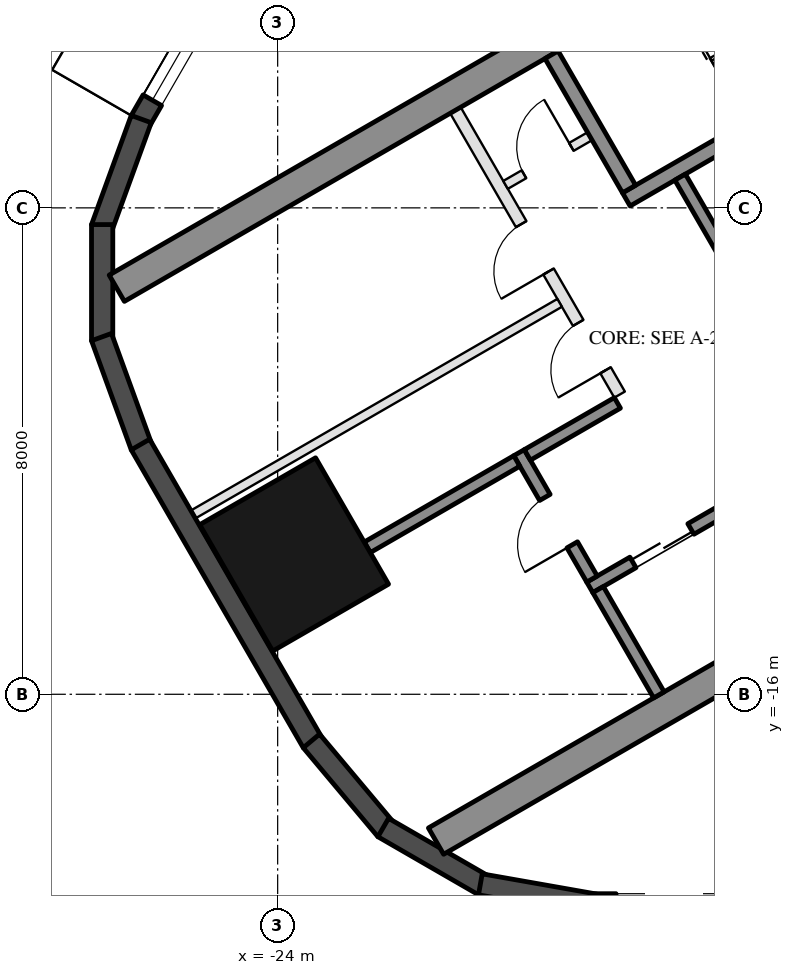
"""IFC4 building model, lengths in metres.
Left out: names, types, materials, properties, quantities, classifications, styles, units other than length and angle.
Written with IfcOpenShell. Run it as: python <this file> out.ifc"""

import sys

from ifc_helpers import new_model, si_unit, direction, frame, frame_2d, origin, origin_2d, place, context, subcontext, project, spatial, rectangle, hollow_rectangle, extrude, element, fill, save


model = new_model("IFC4")
c1 = context("Model", 3, precision=1e-05, world=origin(), true_north=direction((0.0, 1.0)))
c2 = subcontext(c1, "Body", "Model", "MODEL_VIEW")
j1 = project(units=[si_unit("LENGTHUNIT", "METRE"), si_unit("PLANEANGLEUNIT", "RADIAN")], contexts=[c1])
p1 = place(None, origin())
s1 = spatial("IfcSite", under=j1, at=p1, CompositionType="ELEMENT")
p2 = place(p1, origin())
s2 = spatial("IfcBuilding", under=s1, at=p2, CompositionType="ELEMENT")
p3 = place(p2, frame((0.0, 0.0, 209.5)))
s3 = spatial("IfcBuildingStorey", under=s2, at=p3, CompositionType="ELEMENT", Elevation=209.5)
p4 = place(p3, frame((-23.729, -13.7, 0.0), z_axis=(0.0, 0.0, 1.0), x_axis=(-0.5, 0.866025403784, 0.0)))
e1 = element("IfcColumn", 1, at=p4, inside=s3, PredefinedType="COLUMN", context=c2, shape_type="SweptSolid", body=[
    extrude(hollow_rectangle(XDim=2.4, YDim=2.2, WallThickness=0.06, at=origin_2d()), origin(), (0.0, 0.0, 1.0), 3.7),
])
p5 = place(p3, frame((-24.299, -3.176, 0.0), z_axis=(0.0, 0.0, 1.0), x_axis=(-0.500028278809, -0.866009076391, 0.0)))
e2 = element("IfcWall", 2, at=p5, inside=s3, PredefinedType="SOLIDWALL", context=c2, shape_type="SweptSolid", body=[
    extrude(rectangle(XDim=3.916, YDim=0.35, at=frame_2d((1.958, 0.0))), origin(), (0.0, 0.0, 1.0), 3.55),
])
p6 = place(p5, frame((1.625, 0.0, 0.3)))
e3 = element("IfcOpeningElement", 3, at=p6, cuts=e2, PredefinedType="OPENING", context=c2, shape_type="SweptSolid", body=[
    extrude(rectangle(XDim=1.9, YDim=2.65, at=frame_2d((0.95, 1.325))), frame((0.0, 0.185, 0.0), z_axis=(0.0, -1.0, 0.0), x_axis=(1.0, 0.0, 0.0)), (0.0, 0.0, 1.0), 0.37),
])
for number, where, z_axis, x_axis in (
    (4, (-26.244, -6.54, 0.0), (0.0, 0.0, 1.0), (-0.342, -0.94, 0.0)),
    (5, (-26.886, -8.275, 0.0), (0.0, 0.0, 1.0), (0.0, -1.0, 0.0)),
    (6, (-26.897, -10.125, 0.0), (0.0, 0.0, 1.0), (0.342, -0.94, 0.0)),
):
    element("IfcWall", number, at=place(p3, frame(where, z_axis=z_axis, x_axis=x_axis)), inside=s3, PredefinedType="SOLIDWALL", context=c2, shape_type="SweptSolid", body=[
        extrude(rectangle(XDim=1.91, YDim=0.35, at=frame_2d((0.955, 0.0))), origin(), (0.0, 0.0, 1.0), 3.55),
    ])
p7 = place(p3, frame((-26.257, -11.893, 0.0), z_axis=(0.0, 0.0, 1.0), x_axis=(0.500018773155, -0.866014564827, 0.0)))
e7 = element("IfcWall", 7, at=p7, inside=s3, PredefinedType="SOLIDWALL", context=c2, shape_type="SweptSolid", body=[
    extrude(rectangle(XDim=5.658, YDim=0.35, at=frame_2d((2.829, 0.0))), origin(), (0.0, 0.0, 1.0), 3.55),
])
for number, where, z_axis, x_axis in (
    (8, (-23.445, -16.768, 0.0), (0.0, 0.0, 1.0), (0.643, -0.766, 0.0)),
    (9, (-22.264, -18.192, 0.0), (0.0, 0.0, 1.0), (0.866, -0.5, 0.0)),
):
    element("IfcWall", number, at=place(p3, frame(where, z_axis=z_axis, x_axis=x_axis)), inside=s3, PredefinedType="SOLIDWALL", context=c2, shape_type="SweptSolid", body=[
        extrude(rectangle(XDim=1.91, YDim=0.35, at=frame_2d((0.955, 0.0))), origin(), (0.0, 0.0, 1.0), 3.55),
    ])
p8 = place(p3, frame((-20.667, -19.126, 0.0), z_axis=(0.0, 0.0, 1.0), x_axis=(0.984798995425, -0.173697837091, 0.0)))
e10 = element("IfcWall", 10, at=p8, inside=s3, PredefinedType="SOLIDWALL", context=c2, shape_type="SweptSolid", body=[
    extrude(rectangle(XDim=1.91, YDim=0.35, at=frame_2d((0.955, 0.0))), origin(), (0.0, 0.0, 1.0), 3.55),
])
p9 = place(p3, frame((-18.816, -19.455, 0.0), z_axis=(0.0, 0.0, 1.0), x_axis=(1.0, 0.0, 0.0)))
e11 = element("IfcWall", 11, at=p9, inside=s3, PredefinedType="SOLIDWALL", context=c2, shape_type="SweptSolid", body=[
    extrude(rectangle(XDim=11.816, YDim=0.35, at=frame_2d((5.908, 0.0))), origin(), (0.0, 0.0, 1.0), 3.55),
])
p10 = place(p9, frame((0.381, 0.0, 0.3)))
e12 = element("IfcOpeningElement", 12, at=p10, cuts=e11, PredefinedType="OPENING", context=c2, shape_type="SweptSolid", body=[
    extrude(rectangle(XDim=1.9, YDim=2.65, at=frame_2d((0.95, 1.325))), frame((0.0, 0.185, 0.0), z_axis=(0.0, -1.0, 0.0), x_axis=(1.0, 0.0, 0.0)), (0.0, 0.0, 1.0), 0.37),
])
p11 = place(p9, frame((7.79, 0.0, 0.0)))
e13 = element("IfcOpeningElement", 13, at=p11, cuts=e11, PredefinedType="OPENING", context=c2, shape_type="SweptSolid", body=[
    extrude(rectangle(XDim=2.4, YDim=2.4, at=frame_2d((1.2, 1.2))), frame((0.0, 0.185, 0.0), z_axis=(0.0, -1.0, 0.0), x_axis=(1.0, 0.0, 0.0)), (0.0, 0.0, 1.0), 0.37),
])
p12 = place(p9, frame((3.741, 0.0, 0.3)))
e14 = element("IfcOpeningElement", 14, at=p12, cuts=e11, PredefinedType="OPENING", context=c2, shape_type="SweptSolid", body=[
    extrude(rectangle(XDim=1.7, YDim=2.65, at=frame_2d((0.85, 1.325))), frame((0.0, 0.185, 0.0), z_axis=(0.0, -1.0, 0.0), x_axis=(1.0, 0.0, 0.0)), (0.0, 0.0, 1.0), 0.37),
])
p13 = place(p9, frame((5.741, 0.0, 0.3)))
e15 = element("IfcOpeningElement", 15, at=p13, cuts=e11, PredefinedType="OPENING", context=c2, shape_type="SweptSolid", body=[
    extrude(rectangle(XDim=1.7, YDim=2.65, at=frame_2d((0.85, 1.325))), frame((0.0, 0.185, 0.0), z_axis=(0.0, -1.0, 0.0), x_axis=(1.0, 0.0, 0.0)), (0.0, 0.0, 1.0), 0.37),
])
for number, where, z_axis, x_axis in (
    (16, (-13.797, -1.903, 0.0), (0.0, 0.0, 1.0), (-0.866, -0.5, 0.0)),
    (17, (-8.547, -10.997, 0.0), (0.0, 0.0, 1.0), (-0.866, -0.5, 0.0)),
):
    element("IfcWall", number, at=place(p3, frame(where, z_axis=z_axis, x_axis=x_axis)), inside=s3, PredefinedType="SHEAR", context=c2, shape_type="SweptSolid", body=[
        extrude(rectangle(XDim=14.837, YDim=0.5, at=frame_2d((7.418, 0.0))), origin(), (0.0, 0.0, 1.0), 3.5),
    ])
p14 = place(p3, frame((-12.681, -4.636, 0.0), z_axis=(0.0, 0.0, 1.0), x_axis=(-0.866021702275, -0.500006411147, 0.0)))
e18 = element("IfcWall", 18, at=p14, inside=s3, PredefinedType="SHEAR", context=c2, shape_type="SweptSolid", body=[
    extrude(rectangle(XDim=6.45, YDim=0.25, at=frame_2d((3.225, 0.0))), origin(), (0.0, 0.0, 1.0), 3.5),
])
p15 = place(p14, frame((0.3, 0.0, 0.0)))
e19 = element("IfcOpeningElement", 19, at=p15, cuts=e18, PredefinedType="OPENING", context=c2, shape_type="SweptSolid", body=[
    extrude(rectangle(XDim=1.0, YDim=2.1, at=frame_2d((0.5, 1.05))), frame((0.0, 0.135, 0.0), z_axis=(0.0, -1.0, 0.0), x_axis=(1.0, 0.0, 0.0)), (0.0, 0.0, 1.0), 0.27),
])
p16 = place(p3, frame((-19.496, -5.482, 0.0), z_axis=(0.0, 0.0, 1.0), x_axis=(0.499990435942, -0.866030925526, 0.0)))
e20 = element("IfcWall", 20, at=p16, inside=s3, PredefinedType="SHEAR", context=c2, shape_type="SweptSolid", body=[
    extrude(rectangle(XDim=2.55, YDim=0.25, at=frame_2d((1.275, 0.0))), origin(), (0.0, 0.0, 1.0), 3.5),
])
p17 = place(p3, frame((-17.381, -7.495, 0.0), z_axis=(0.0, 0.0, 1.0), x_axis=(0.500011755427, -0.866018616679, 0.0)))
e21 = element("IfcWall", 21, at=p17, inside=s3, PredefinedType="SHEAR", context=c2, shape_type="SweptSolid", body=[
    extrude(rectangle(XDim=2.8, YDim=0.2, at=frame_2d((1.4, 0.0))), origin(), (0.0, 0.0, 1.0), 3.5),
])
p18 = place(p3, frame((-10.068, -9.162, 0.0), z_axis=(0.0, 0.0, 1.0), x_axis=(-0.866032725843, -0.499987317609, 0.0)))
e22 = element("IfcWall", 22, at=p18, inside=s3, PredefinedType="SHEAR", context=c2, shape_type="SweptSolid", body=[
    extrude(rectangle(XDim=10.16, YDim=0.2, at=frame_2d((5.08, 0.0))), origin(), (0.0, 0.0, 1.0), 3.5),
])
p19 = place(p18, frame((0.62, 0.0, 0.0)))
e23 = element("IfcOpeningElement", 23, at=p19, cuts=e22, PredefinedType="OPENING", context=c2, shape_type="SweptSolid", body=[
    extrude(rectangle(XDim=1.1, YDim=2.1, at=frame_2d((0.55, 1.05))), frame((0.0, 0.11, 0.0), z_axis=(0.0, -1.0, 0.0), x_axis=(1.0, 0.0, 0.0)), (0.0, 0.0, 1.0), 0.22),
])
p20 = place(p18, frame((3.16, 0.0, 0.0)))
e24 = element("IfcOpeningElement", 24, at=p20, cuts=e22, PredefinedType="OPENING", context=c2, shape_type="SweptSolid", body=[
    extrude(rectangle(XDim=1.1, YDim=2.1, at=frame_2d((0.55, 1.05))), frame((0.0, 0.11, 0.0), z_axis=(0.0, -1.0, 0.0), x_axis=(1.0, 0.0, 0.0)), (0.0, 0.0, 1.0), 0.22),
])
p21 = place(p18, frame((5.7, 0.0, 0.0)))
e25 = element("IfcOpeningElement", 25, at=p21, cuts=e22, PredefinedType="OPENING", context=c2, shape_type="SweptSolid", body=[
    extrude(rectangle(XDim=1.1, YDim=2.1, at=frame_2d((0.55, 1.05))), frame((0.0, 0.11, 0.0), z_axis=(0.0, -1.0, 0.0), x_axis=(1.0, 0.0, 0.0)), (0.0, 0.0, 1.0), 0.22),
])
p22 = place(p18, frame((8.24, 0.0, 0.0)))
e26 = element("IfcOpeningElement", 26, at=p22, cuts=e22, PredefinedType="OPENING", context=c2, shape_type="SweptSolid", body=[
    extrude(rectangle(XDim=1.1, YDim=2.1, at=frame_2d((0.55, 1.05))), frame((0.0, 0.11, 0.0), z_axis=(0.0, -1.0, 0.0), x_axis=(1.0, 0.0, 0.0)), (0.0, 0.0, 1.0), 0.22),
])
p23 = place(p3, frame((-20.031, -12.026, 0.0), z_axis=(0.0, 0.0, 1.0), x_axis=(0.500033551112, -0.866006032174, 0.0)))
e27 = element("IfcWall", 27, at=p23, inside=s3, PredefinedType="SHEAR", context=c2, shape_type="SweptSolid", body=[
    extrude(rectangle(XDim=2.4, YDim=0.2, at=frame_2d((1.2, 0.0))), origin(), (0.0, 0.0, 1.0), 3.5),
])
p24 = place(p23, frame((0.85, 0.0, 0.0)))
e28 = element("IfcOpeningElement", 28, at=p24, cuts=e27, PredefinedType="OPENING", context=c2, shape_type="SweptSolid", body=[
    extrude(rectangle(XDim=0.9, YDim=2.1, at=frame_2d((0.45, 1.05))), frame((0.0, 0.11, 0.0), z_axis=(0.0, -1.0, 0.0), x_axis=(1.0, 0.0, 0.0)), (0.0, 0.0, 1.0), 0.22),
])
p25 = place(p3, frame((-18.413, -11.208, 0.0), z_axis=(0.0, 0.0, 1.0), x_axis=(-0.866038183914, -0.499977863513, 0.0)))
e29 = element("IfcWall", 29, at=p25, inside=s3, PredefinedType="SHEAR", context=c2, shape_type="SweptSolid", body=[
    extrude(rectangle(XDim=1.71, YDim=0.2, at=frame_2d((0.855, 0.0))), origin(), (0.0, 0.0, 1.0), 3.5),
])
p26 = place(p3, frame((-18.73, -14.278, 0.0), z_axis=(0.0, 0.0, 1.0), x_axis=(0.50002537861, -0.866010750942, 0.0)))
e30 = element("IfcWall", 30, at=p26, inside=s3, PredefinedType="SHEAR", context=c2, shape_type="SweptSolid", body=[
    extrude(rectangle(XDim=2.0, YDim=0.2, at=frame_2d((1.0, 0.0))), origin(), (0.0, 0.0, 1.0), 3.5),
])
p27 = place(p3, frame((-20.067, -12.163, 0.0), z_axis=(0.0, 0.0, 1.0), x_axis=(-0.866055327414, -0.49994816717, 0.0)))
e31 = element("IfcWall", 31, at=p27, inside=s3, PredefinedType="SHEAR", context=c2, shape_type="SweptSolid", body=[
    extrude(rectangle(XDim=2.84, YDim=0.2, at=frame_2d((1.42, 0.0))), origin(), (0.0, 0.0, 1.0), 3.5),
])
p28 = place(p3, frame((-21.076, -6.395, 0.0), z_axis=(0.0, 0.0, 1.0), x_axis=(0.50001468107, -0.866016927499, 0.0)))
e32 = element("IfcWall", 32, at=p28, inside=s3, PredefinedType="PARTITIONING", context=c2, shape_type="SweptSolid", body=[
    extrude(rectangle(XDim=5.4, YDim=0.2, at=frame_2d((2.7, 0.0))), origin(), (0.0, 0.0, 1.0), 3.5),
])
p29 = place(p28, frame((2.163, 0.0, 0.0)))
e33 = element("IfcOpeningElement", 33, at=p29, cuts=e32, PredefinedType="OPENING", context=c2, shape_type="SweptSolid", body=[
    extrude(rectangle(XDim=0.9, YDim=2.1, at=frame_2d((0.45, 1.05))), frame((0.0, 0.11, 0.0), z_axis=(0.0, -1.0, 0.0), x_axis=(1.0, 0.0, 0.0)), (0.0, 0.0, 1.0), 0.22),
])
p30 = place(p28, frame((4.038, 0.0, 0.0)))
e34 = element("IfcOpeningElement", 34, at=p30, cuts=e32, PredefinedType="OPENING", context=c2, shape_type="SweptSolid", body=[
    extrude(rectangle(XDim=0.9, YDim=2.1, at=frame_2d((0.45, 1.05))), frame((0.0, 0.11, 0.0), z_axis=(0.0, -1.0, 0.0), x_axis=(1.0, 0.0, 0.0)), (0.0, 0.0, 1.0), 0.22),
])
p31 = place(p3, frame((-18.866, -6.822, 0.0), z_axis=(0.0, 0.0, 1.0), x_axis=(-0.866028054938, -0.499995408039, 0.0)))
e35 = element("IfcWall", 35, at=p31, inside=s3, PredefinedType="PARTITIONING", context=c2, shape_type="SweptSolid", body=[
    extrude(rectangle(XDim=1.6, YDim=0.15, at=frame_2d((0.8, 0.0))), origin(), (0.0, 0.0, 1.0), 3.5),
])
p32 = place(p31, frame((0.35, 0.0, 0.0)))
e36 = element("IfcOpeningElement", 36, at=p32, cuts=e35, PredefinedType="OPENING", context=c2, shape_type="SweptSolid", body=[
    extrude(rectangle(XDim=0.9, YDim=2.1, at=frame_2d((0.45, 1.05))), frame((0.0, 0.085, 0.0), z_axis=(0.0, -1.0, 0.0), x_axis=(1.0, 0.0, 0.0)), (0.0, 0.0, 1.0), 0.17),
])
p33 = place(p3, frame((-19.363, -9.562, 0.0), z_axis=(0.0, 0.0, 1.0), x_axis=(-0.866016523273, -0.500015381182, 0.0)))
e37 = element("IfcWall", 37, at=p33, inside=s3, PredefinedType="PARTITIONING", context=c2, shape_type="SweptSolid", body=[
    extrude(rectangle(XDim=6.95, YDim=0.15, at=frame_2d((3.475, 0.0))), origin(), (0.0, 0.0, 1.0), 3.5),
])
p34 = place(p6, origin())
e38 = element("IfcWindow", 38, at=p34, inside=s3, PartitioningType="SINGLE_PANEL", PredefinedType="WINDOW", context=c2, shape_type="SweptSolid", body=[
    extrude(rectangle(XDim=1.9, YDim=2.65, at=frame_2d((0.95, 1.325))), frame((0.0, 0.03, 0.0), z_axis=(0.0, -1.0, 0.0), x_axis=(1.0, 0.0, 0.0)), (0.0, 0.0, 1.0), 0.06),
])
fill(e3, e38)
p35 = place(p32, frame((0.9, 0.0, 0.0), z_axis=(0.0, 0.0, 1.0), x_axis=(-1.0, 0.0, 0.0)))
e39 = element("IfcDoor", 39, at=p35, inside=s3, OperationType="SINGLE_SWING_RIGHT", PredefinedType="DOOR", context=c2, shape_type="SweptSolid", body=[
    extrude(rectangle(XDim=0.9, YDim=2.1, at=frame_2d((0.45, 1.05))), frame((0.0, 0.025, 0.0), z_axis=(0.0, -1.0, 0.0), x_axis=(1.0, 0.0, 0.0)), (0.0, 0.0, 1.0), 0.05),
])
fill(e36, e39)
p36 = place(p22, origin())
e40 = element("IfcDoor", 40, at=p36, inside=s3, OperationType="DOUBLE_DOOR_SLIDING", PredefinedType="DOOR", context=c2, shape_type="SweptSolid", body=[
    extrude(rectangle(XDim=1.1, YDim=2.1, at=frame_2d((0.55, 1.05))), frame((0.0, 0.025, 0.0), z_axis=(0.0, -1.0, 0.0), x_axis=(1.0, 0.0, 0.0)), (0.0, 0.0, 1.0), 0.05),
])
fill(e26, e40)
p37 = place(p24, frame((0.9, 0.0, 0.0), z_axis=(0.0, 0.0, 1.0), x_axis=(-1.0, 0.0, 0.0)))
e41 = element("IfcDoor", 41, at=p37, inside=s3, OperationType="SINGLE_SWING_LEFT", PredefinedType="DOOR", context=c2, shape_type="SweptSolid", body=[
    extrude(rectangle(XDim=0.9, YDim=2.1, at=frame_2d((0.45, 1.05))), frame((0.0, 0.025, 0.0), z_axis=(0.0, -1.0, 0.0), x_axis=(1.0, 0.0, 0.0)), (0.0, 0.0, 1.0), 0.05),
])
fill(e28, e41)
p38 = place(p29, frame((0.9, 0.0, 0.0), z_axis=(0.0, 0.0, 1.0), x_axis=(-1.0, 0.0, 0.0)))
e42 = element("IfcDoor", 42, at=p38, inside=s3, OperationType="SINGLE_SWING_LEFT", PredefinedType="DOOR", context=c2, shape_type="SweptSolid", body=[
    extrude(rectangle(XDim=0.9, YDim=2.1, at=frame_2d((0.45, 1.05))), frame((0.0, 0.025, 0.0), z_axis=(0.0, -1.0, 0.0), x_axis=(1.0, 0.0, 0.0)), (0.0, 0.0, 1.0), 0.05),
])
fill(e33, e42)
p39 = place(p30, frame((0.9, 0.0, 0.0), z_axis=(0.0, 0.0, 1.0), x_axis=(-1.0, 0.0, 0.0)))
e43 = element("IfcDoor", 43, at=p39, inside=s3, OperationType="SINGLE_SWING_LEFT", PredefinedType="DOOR", context=c2, shape_type="SweptSolid", body=[
    extrude(rectangle(XDim=0.9, YDim=2.1, at=frame_2d((0.45, 1.05))), frame((0.0, 0.025, 0.0), z_axis=(0.0, -1.0, 0.0), x_axis=(1.0, 0.0, 0.0)), (0.0, 0.0, 1.0), 0.05),
])
fill(e34, e43)
save(model, sys.argv[1])
